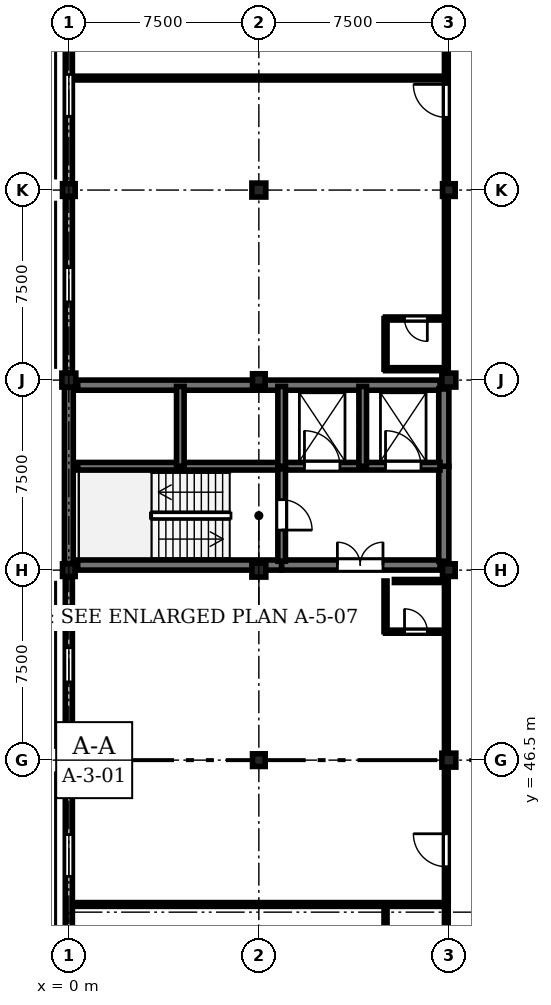
"""IFC4 building model, lengths in metres.
Left out: names, types, materials, properties, quantities, classifications, styles, units other than length and angle.
Written with IfcOpenShell. Run it as: python <this file> out.ifc"""

import sys

from ifc_helpers import new_model, si_unit, direction, frame, frame_2d, origin, origin_2d, place, context, subcontext, project, spatial, rectangle, extrude, element, fill, save


model = new_model("IFC4")
c1 = context("Model", 3, precision=1e-05, world=origin(), true_north=direction((0.0, 1.0)))
c2 = subcontext(c1, "Body", "Model", "MODEL_VIEW")
j1 = project(units=[si_unit("LENGTHUNIT", "METRE"), si_unit("PLANEANGLEUNIT", "RADIAN")], contexts=[c1])
p1 = place(None, origin())
s1 = spatial("IfcSite", under=j1, at=p1, CompositionType="ELEMENT")
p2 = place(p1, origin())
s2 = spatial("IfcBuilding", under=s1, at=p2, CompositionType="ELEMENT")
p3 = place(p2, frame((0.0, 0.0, 25.95)))
s3 = spatial("IfcBuildingStorey", under=s2, at=p3, CompositionType="ELEMENT", Elevation=25.95)
p4 = place(p3, frame((0.0, 46.5, 0.0), z_axis=(0.0, 0.0, 1.0), x_axis=(1.0, 0.0, 0.0)))
e1 = element("IfcColumn", 1, at=p4, inside=s3, PredefinedType="COLUMN", context=c2, shape_type="SweptSolid", body=[
    extrude(rectangle(XDim=0.55, YDim=0.55, at=origin_2d()), origin(), (0.0, 0.0, 1.0), 4.05),
])
p5 = place(p3, frame((0.0, 54.0, 0.0), z_axis=(0.0, 0.0, 1.0), x_axis=(1.0, 0.0, 0.0)))
e2 = element("IfcColumn", 2, at=p5, inside=s3, PredefinedType="COLUMN", context=c2, shape_type="SweptSolid", body=[
    extrude(rectangle(XDim=0.5, YDim=0.5, at=origin_2d()), origin(), (0.0, 0.0, 1.0), 4.05),
])
p6 = place(p3, frame((0.0, 61.5, 0.0), z_axis=(0.0, 0.0, 1.0), x_axis=(1.0, 0.0, 0.0)))
e3 = element("IfcColumn", 3, at=p6, inside=s3, PredefinedType="COLUMN", context=c2, shape_type="SweptSolid", body=[
    extrude(rectangle(XDim=0.55, YDim=0.55, at=origin_2d()), origin(), (0.0, 0.0, 1.0), 4.05),
])
for number, where, z_axis, x_axis in (
    (4, (0.0, 69.0, 0.0), (0.0, 0.0, 1.0), (1.0, 0.0, 0.0)),
    (5, (7.5, 46.5, 0.0), (0.0, 0.0, 1.0), (1.0, 0.0, 0.0)),
):
    element("IfcColumn", number, at=place(p3, frame(where, z_axis=z_axis, x_axis=x_axis)), inside=s3, PredefinedType="COLUMN", context=c2, shape_type="SweptSolid", body=[
        extrude(rectangle(XDim=0.5, YDim=0.5, at=origin_2d()), origin(), (0.0, 0.0, 1.0), 4.05),
    ])
p7 = place(p3, frame((7.5, 54.0, 0.0), z_axis=(0.0, 0.0, 1.0), x_axis=(1.0, 0.0, 0.0)))
e6 = element("IfcColumn", 6, at=p7, inside=s3, PredefinedType="COLUMN", context=c2, shape_type="SweptSolid", body=[
    extrude(rectangle(XDim=0.55, YDim=0.55, at=origin_2d()), origin(), (0.0, 0.0, 1.0), 4.05),
])
p8 = place(p3, frame((7.5, 61.5, 0.0), z_axis=(0.0, 0.0, 1.0), x_axis=(1.0, 0.0, 0.0)))
e7 = element("IfcColumn", 7, at=p8, inside=s3, PredefinedType="COLUMN", context=c2, shape_type="SweptSolid", body=[
    extrude(rectangle(XDim=0.5, YDim=0.5, at=origin_2d()), origin(), (0.0, 0.0, 1.0), 4.05),
])
for number, where, z_axis, x_axis in (
    (8, (7.5, 69.0, 0.0), (0.0, 0.0, 1.0), (1.0, 0.0, 0.0)),
    (9, (15.0, 46.5, 0.0), (0.0, 0.0, 1.0), (1.0, 0.0, 0.0)),
):
    element("IfcColumn", number, at=place(p3, frame(where, z_axis=z_axis, x_axis=x_axis)), inside=s3, PredefinedType="COLUMN", context=c2, shape_type="SweptSolid", body=[
        extrude(rectangle(XDim=0.55, YDim=0.55, at=origin_2d()), origin(), (0.0, 0.0, 1.0), 4.05),
    ])
p9 = place(p3, frame((15.0, 54.0, 0.0), z_axis=(0.0, 0.0, 1.0), x_axis=(1.0, 0.0, 0.0)))
e10 = element("IfcColumn", 10, at=p9, inside=s3, PredefinedType="COLUMN", context=c2, shape_type="SweptSolid", body=[
    extrude(rectangle(XDim=0.5, YDim=0.5, at=origin_2d()), origin(), (0.0, 0.0, 1.0), 4.05),
])
p10 = place(p3, frame((15.0, 61.5, 0.0), z_axis=(0.0, 0.0, 1.0), x_axis=(1.0, 0.0, 0.0)))
e11 = element("IfcColumn", 11, at=p10, inside=s3, PredefinedType="COLUMN", context=c2, shape_type="SweptSolid", body=[
    extrude(rectangle(XDim=0.55, YDim=0.55, at=origin_2d()), origin(), (0.0, 0.0, 1.0), 4.05),
])
p11 = place(p3, frame((15.0, 69.0, 0.0), z_axis=(0.0, 0.0, 1.0), x_axis=(1.0, 0.0, 0.0)))
e12 = element("IfcColumn", 12, at=p11, inside=s3, PredefinedType="COLUMN", context=c2, shape_type="SweptSolid", body=[
    extrude(rectangle(XDim=0.5, YDim=0.5, at=origin_2d()), origin(), (0.0, 0.0, 1.0), 4.05),
])
p12 = place(p3, frame((0.0, 39.26, 0.0), z_axis=(0.0, 0.0, 1.0), x_axis=(0.0, 1.0, 0.0)))
e13 = element("IfcWall", 13, at=p12, inside=s3, PredefinedType="STANDARD", context=c2, shape_type="SweptSolid", body=[
    extrude(rectangle(XDim=6.955, YDim=0.28, at=frame_2d((3.478, 0.0))), origin(), (0.0, 0.0, 1.0), 3.17),
])
p13 = place(p12, frame((2.653, 0.0, 0.85)))
e14 = element("IfcOpeningElement", 14, at=p13, cuts=e13, PredefinedType="OPENING", context=c2, shape_type="SweptSolid", body=[
    extrude(rectangle(XDim=1.65, YDim=2.04, at=frame_2d((0.825, 1.02))), frame((0.0, 0.15, 0.0), z_axis=(0.0, -1.0, 0.0), x_axis=(1.0, 0.0, 0.0)), (0.0, 0.0, 1.0), 0.3),
])
p14 = place(p3, frame((0.0, 46.785, 0.0), z_axis=(0.0, 0.0, 1.0), x_axis=(0.0, 1.0, 0.0)))
e15 = element("IfcWall", 15, at=p14, inside=s3, PredefinedType="STANDARD", context=c2, shape_type="SweptSolid", body=[
    extrude(rectangle(XDim=6.955, YDim=0.28, at=frame_2d((3.478, 0.0))), origin(), (0.0, 0.0, 1.0), 3.17),
])
p15 = place(p14, frame((2.802, 0.0, 0.85)))
e16 = element("IfcOpeningElement", 16, at=p15, cuts=e15, PredefinedType="OPENING", context=c2, shape_type="SweptSolid", body=[
    extrude(rectangle(XDim=1.35, YDim=2.04, at=frame_2d((0.675, 1.02))), frame((0.0, 0.15, 0.0), z_axis=(0.0, -1.0, 0.0), x_axis=(1.0, 0.0, 0.0)), (0.0, 0.0, 1.0), 0.3),
])
p16 = place(p3, frame((0.0, 54.26, 0.0), z_axis=(0.0, 0.0, 1.0), x_axis=(0.0, 1.0, 0.0)))
e17 = element("IfcWall", 17, at=p16, inside=s3, PredefinedType="SHEAR", context=c2, shape_type="SweptSolid", body=[
    extrude(rectangle(XDim=6.955, YDim=0.35, at=frame_2d((3.478, 0.0))), origin(), (0.0, 0.0, 1.0), 3.77),
])
p17 = place(p3, frame((0.0, 61.785, 0.0), z_axis=(0.0, 0.0, 1.0), x_axis=(0.0, 1.0, 0.0)))
e18 = element("IfcWall", 18, at=p17, inside=s3, PredefinedType="STANDARD", context=c2, shape_type="SweptSolid", body=[
    extrude(rectangle(XDim=6.955, YDim=0.28, at=frame_2d((3.478, 0.0))), origin(), (0.0, 0.0, 1.0), 3.17),
])
p18 = place(p17, frame((2.802, 0.0, 0.85)))
e19 = element("IfcOpeningElement", 19, at=p18, cuts=e18, PredefinedType="OPENING", context=c2, shape_type="SweptSolid", body=[
    extrude(rectangle(XDim=1.35, YDim=2.04, at=frame_2d((0.675, 1.02))), frame((0.0, 0.15, 0.0), z_axis=(0.0, -1.0, 0.0), x_axis=(1.0, 0.0, 0.0)), (0.0, 0.0, 1.0), 0.3),
])
p19 = place(p3, frame((0.0, 69.26, 0.0), z_axis=(0.0, 0.0, 1.0), x_axis=(0.0, 1.0, 0.0)))
e20 = element("IfcWall", 20, at=p19, inside=s3, PredefinedType="STANDARD", context=c2, shape_type="SweptSolid", body=[
    extrude(rectangle(XDim=6.955, YDim=0.28, at=frame_2d((3.478, 0.0))), origin(), (0.0, 0.0, 1.0), 3.17),
])
p20 = place(p19, frame((2.653, 0.0, 0.85)))
e21 = element("IfcOpeningElement", 21, at=p20, cuts=e20, PredefinedType="OPENING", context=c2, shape_type="SweptSolid", body=[
    extrude(rectangle(XDim=1.65, YDim=2.04, at=frame_2d((0.825, 1.02))), frame((0.0, 0.15, 0.0), z_axis=(0.0, -1.0, 0.0), x_axis=(1.0, 0.0, 0.0)), (0.0, 0.0, 1.0), 0.3),
])
p21 = place(p3, frame((0.35, 54.2, 0.0), z_axis=(0.0, 0.0, 1.0), x_axis=(1.0, 0.0, 0.0)))
e22 = element("IfcWall", 22, at=p21, inside=s3, PredefinedType="SHEAR", context=c2, shape_type="SweptSolid", body=[
    extrude(rectangle(XDim=8.05, YDim=0.4, at=frame_2d((4.025, 0.0))), origin(), (0.0, 0.0, 1.0), 3.77),
])
p22 = place(p3, frame((8.4, 54.2, 0.0), z_axis=(0.0, 0.0, 1.0), x_axis=(1.0, 0.0, 0.0)))
e23 = element("IfcWall", 23, at=p22, inside=s3, PredefinedType="SHEAR", context=c2, shape_type="SweptSolid", body=[
    extrude(rectangle(XDim=6.25, YDim=0.4, at=frame_2d((3.125, 0.0))), origin(), (0.0, 0.0, 1.0), 3.77),
])
p23 = place(p22, frame((2.2, 0.0, 0.0)))
e24 = element("IfcOpeningElement", 24, at=p23, cuts=e23, PredefinedType="OPENING", context=c2, shape_type="SweptSolid", body=[
    extrude(rectangle(XDim=1.8, YDim=2.25, at=frame_2d((0.9, 1.125))), frame((0.0, 0.21, 0.0), z_axis=(0.0, -1.0, 0.0), x_axis=(1.0, 0.0, 0.0)), (0.0, 0.0, 1.0), 0.42),
])
p24 = place(p3, frame((0.35, 61.3, 0.0), z_axis=(0.0, 0.0, 1.0), x_axis=(1.0, 0.0, 0.0)))
e25 = element("IfcWall", 25, at=p24, inside=s3, PredefinedType="SHEAR", context=c2, shape_type="SweptSolid", body=[
    extrude(rectangle(XDim=14.3, YDim=0.4, at=frame_2d((7.15, 0.0))), origin(), (0.0, 0.0, 1.0), 3.77),
])
p25 = place(p3, frame((14.8, 54.35, 0.0), z_axis=(0.0, 0.0, 1.0), x_axis=(0.0, 1.0, 0.0)))
e26 = element("IfcWall", 26, at=p25, inside=s3, PredefinedType="SHEAR", context=c2, shape_type="SweptSolid", body=[
    extrude(rectangle(XDim=3.75, YDim=0.4, at=frame_2d((1.875, 0.0))), origin(), (0.0, 0.0, 1.0), 3.77),
])
p26 = place(p3, frame((14.8, 58.1, 0.0), z_axis=(0.0, 0.0, 1.0), x_axis=(0.0, 1.0, 0.0)))
e27 = element("IfcWall", 27, at=p26, inside=s3, PredefinedType="SHEAR", context=c2, shape_type="SweptSolid", body=[
    extrude(rectangle(XDim=3.05, YDim=0.4, at=frame_2d((1.525, 0.0))), origin(), (0.0, 0.0, 1.0), 3.77),
])
p27 = place(p3, frame((0.35, 58.1, 0.0), z_axis=(0.0, 0.0, 1.0), x_axis=(1.0, 0.0, 0.0)))
e28 = element("IfcWall", 28, at=p27, inside=s3, PredefinedType="SHEAR", context=c2, shape_type="SweptSolid", body=[
    extrude(rectangle(XDim=8.05, YDim=0.3, at=frame_2d((4.025, 0.0))), origin(), (0.0, 0.0, 1.0), 3.77),
])
p28 = place(p3, frame((8.4, 58.1, 0.0), z_axis=(0.0, 0.0, 1.0), x_axis=(1.0, 0.0, 0.0)))
e29 = element("IfcWall", 29, at=p28, inside=s3, PredefinedType="SHEAR", context=c2, shape_type="SweptSolid", body=[
    extrude(rectangle(XDim=6.25, YDim=0.3, at=frame_2d((3.125, 0.0))), origin(), (0.0, 0.0, 1.0), 3.77),
])
p29 = place(p28, frame((0.9, 0.0, 0.0)))
e30 = element("IfcOpeningElement", 30, at=p29, cuts=e29, PredefinedType="OPENING", context=c2, shape_type="SweptSolid", body=[
    extrude(rectangle(XDim=1.4, YDim=2.25, at=frame_2d((0.7, 1.125))), frame((0.0, 0.16, 0.0), z_axis=(0.0, -1.0, 0.0), x_axis=(1.0, 0.0, 0.0)), (0.0, 0.0, 1.0), 0.32),
])
p30 = place(p28, frame((4.1, 0.0, 0.0)))
e31 = element("IfcOpeningElement", 31, at=p30, cuts=e29, PredefinedType="OPENING", context=c2, shape_type="SweptSolid", body=[
    extrude(rectangle(XDim=1.4, YDim=2.25, at=frame_2d((0.7, 1.125))), frame((0.0, 0.16, 0.0), z_axis=(0.0, -1.0, 0.0), x_axis=(1.0, 0.0, 0.0)), (0.0, 0.0, 1.0), 0.32),
])
p31 = place(p3, frame((8.4, 58.0, 0.0), z_axis=(0.0, 0.0, 1.0), x_axis=(0.0, -1.0, 0.0)))
e32 = element("IfcWall", 32, at=p31, inside=s3, PredefinedType="SHEAR", context=c2, shape_type="SweptSolid", body=[
    extrude(rectangle(XDim=3.65, YDim=0.3, at=frame_2d((1.825, 0.0))), origin(), (0.0, 0.0, 1.0), 3.77),
])
p32 = place(p31, frame((1.22, 0.0, 0.0)))
e33 = element("IfcOpeningElement", 33, at=p32, cuts=e32, PredefinedType="OPENING", context=c2, shape_type="SweptSolid", body=[
    extrude(rectangle(XDim=1.2, YDim=2.25, at=frame_2d((0.6, 1.125))), frame((0.0, 0.16, 0.0), z_axis=(0.0, -1.0, 0.0), x_axis=(1.0, 0.0, 0.0)), (0.0, 0.0, 1.0), 0.32),
])
for number, where, z_axis, x_axis in (
    (34, (4.4, 58.1, 0.0), (0.0, 0.0, 1.0), (0.0, 1.0, 0.0)),
    (35, (8.4, 58.1, 0.0), (0.0, 0.0, 1.0), (0.0, 1.0, 0.0)),
    (36, (11.6, 58.1, 0.0), (0.0, 0.0, 1.0), (0.0, 1.0, 0.0)),
):
    element("IfcWall", number, at=place(p3, frame(where, z_axis=z_axis, x_axis=x_axis)), inside=s3, PredefinedType="SHEAR", context=c2, shape_type="SweptSolid", body=[
        extrude(rectangle(XDim=3.15, YDim=0.3, at=frame_2d((1.575, 0.0))), origin(), (0.0, 0.0, 1.0), 3.77),
    ])
p33 = place(p3, frame((14.9, 28.197, 0.0), z_axis=(0.0, 0.0, 1.0), x_axis=(0.0, 1.0, 0.0)))
e37 = element("IfcWall", 37, at=p33, inside=s3, PredefinedType="PARTITIONING", context=c2, shape_type="SweptSolid", body=[
    extrude(rectangle(XDim=12.606, YDim=0.15, at=frame_2d((6.303, 0.0))), origin(), (0.0, 0.0, 1.0), 3.055),
])
p34 = place(p33, frame((6.704, 0.0, 0.0)))
e38 = element("IfcOpeningElement", 38, at=p34, cuts=e37, PredefinedType="OPENING", context=c2, shape_type="SweptSolid", body=[
    extrude(rectangle(XDim=1.35, YDim=2.25, at=frame_2d((0.675, 1.125))), frame((0.0, 0.085, 0.0), z_axis=(0.0, -1.0, 0.0), x_axis=(1.0, 0.0, 0.0)), (0.0, 0.0, 1.0), 0.17),
])
p35 = place(p3, frame((12.5, 38.803, 0.0), z_axis=(0.0, 0.0, 1.0), x_axis=(0.0, 1.0, 0.0)))
e39 = element("IfcWall", 39, at=p35, inside=s3, PredefinedType="PARTITIONING", context=c2, shape_type="SweptSolid", body=[
    extrude(rectangle(XDim=2.0, YDim=0.12, at=frame_2d((1.0, 0.0))), origin(), (0.0, 0.0, 1.0), 3.755),
])
p36 = place(p3, frame((14.9, 40.963, 0.0), z_axis=(0.0, 0.0, 1.0), x_axis=(0.0, 1.0, 0.0)))
e40 = element("IfcWall", 40, at=p36, inside=s3, PredefinedType="PARTITIONING", context=c2, shape_type="SweptSolid", body=[
    extrude(rectangle(XDim=12.607, YDim=0.15, at=frame_2d((6.303, 0.0))), origin(), (0.0, 0.0, 1.0), 3.205),
])
p37 = place(p36, frame((1.331, 0.0, 0.0)))
e41 = element("IfcOpeningElement", 41, at=p37, cuts=e40, PredefinedType="OPENING", context=c2, shape_type="SweptSolid", body=[
    extrude(rectangle(XDim=1.3, YDim=2.2, at=frame_2d((0.65, 1.1))), frame((0.0, 0.085, 0.0), z_axis=(0.0, -1.0, 0.0), x_axis=(1.0, 0.0, 0.0)), (0.0, 0.0, 1.0), 0.17),
])
p38 = place(p3, frame((12.5, 51.57, 0.0), z_axis=(0.0, 0.0, 1.0), x_axis=(1.0, 0.0, 0.0)))
e42 = element("IfcWall", 42, at=p38, inside=s3, PredefinedType="PARTITIONING", context=c2, shape_type="SweptSolid", body=[
    extrude(rectangle(XDim=2.4, YDim=0.12, at=frame_2d((1.2, 0.0))), origin(), (0.0, 0.0, 1.0), 3.755),
])
p39 = place(p38, frame((0.75, 0.0, 0.0)))
e43 = element("IfcOpeningElement", 43, at=p39, cuts=e42, PredefinedType="OPENING", context=c2, shape_type="SweptSolid", body=[
    extrude(rectangle(XDim=0.9, YDim=2.1, at=frame_2d((0.45, 1.05))), frame((0.0, 0.07, 0.0), z_axis=(0.0, -1.0, 0.0), x_axis=(1.0, 0.0, 0.0)), (0.0, 0.0, 1.0), 0.14),
])
p40 = place(p3, frame((12.5, 51.57, 0.0), z_axis=(0.0, 0.0, 1.0), x_axis=(0.0, 1.0, 0.0)))
e44 = element("IfcWall", 44, at=p40, inside=s3, PredefinedType="PARTITIONING", context=c2, shape_type="SweptSolid", body=[
    extrude(rectangle(XDim=2.0, YDim=0.12, at=frame_2d((1.0, 0.0))), origin(), (0.0, 0.0, 1.0), 3.755),
])
p41 = place(p3, frame((14.9, 61.93, 0.0), z_axis=(0.0, 0.0, 1.0), x_axis=(0.0, 1.0, 0.0)))
e45 = element("IfcWall", 45, at=p41, inside=s3, PredefinedType="PARTITIONING", context=c2, shape_type="SweptSolid", body=[
    extrude(rectangle(XDim=11.49, YDim=0.15, at=frame_2d((5.745, 0.0))), origin(), (0.0, 0.0, 1.0), 3.205),
])
p42 = place(p41, frame((9.94, 0.0, 0.0)))
e46 = element("IfcOpeningElement", 46, at=p42, cuts=e45, PredefinedType="OPENING", context=c2, shape_type="SweptSolid", body=[
    extrude(rectangle(XDim=1.3, YDim=2.2, at=frame_2d((0.65, 1.1))), frame((0.0, 0.085, 0.0), z_axis=(0.0, -1.0, 0.0), x_axis=(1.0, 0.0, 0.0)), (0.0, 0.0, 1.0), 0.17),
])
p43 = place(p3, frame((14.9, 63.93, 0.0), z_axis=(0.0, 0.0, 1.0), x_axis=(-1.0, 0.0, 0.0)))
e47 = element("IfcWall", 47, at=p43, inside=s3, PredefinedType="PARTITIONING", context=c2, shape_type="SweptSolid", body=[
    extrude(rectangle(XDim=2.4, YDim=0.12, at=frame_2d((1.2, 0.0))), origin(), (0.0, 0.0, 1.0), 3.755),
])
p44 = place(p43, frame((0.75, 0.0, 0.0)))
e48 = element("IfcOpeningElement", 48, at=p44, cuts=e47, PredefinedType="OPENING", context=c2, shape_type="SweptSolid", body=[
    extrude(rectangle(XDim=0.9, YDim=2.1, at=frame_2d((0.45, 1.05))), frame((0.0, 0.07, 0.0), z_axis=(0.0, -1.0, 0.0), x_axis=(1.0, 0.0, 0.0)), (0.0, 0.0, 1.0), 0.14),
])
p45 = place(p3, frame((12.5, 61.93, 0.0), z_axis=(0.0, 0.0, 1.0), x_axis=(0.0, 1.0, 0.0)))
e49 = element("IfcWall", 49, at=p45, inside=s3, PredefinedType="PARTITIONING", context=c2, shape_type="SweptSolid", body=[
    extrude(rectangle(XDim=2.0, YDim=0.12, at=frame_2d((1.0, 0.0))), origin(), (0.0, 0.0, 1.0), 3.755),
])
p46 = place(p3, frame((14.9, 73.58, 0.0), z_axis=(0.0, 0.0, 1.0), x_axis=(0.0, 1.0, 0.0)))
e50 = element("IfcWall", 50, at=p46, inside=s3, PredefinedType="PARTITIONING", context=c2, shape_type="SweptSolid", body=[
    extrude(rectangle(XDim=11.49, YDim=0.15, at=frame_2d((5.745, 0.0))), origin(), (0.0, 0.0, 1.0), 3.055),
])
p47 = place(p46, frame((6.998, 0.0, 0.0)))
e51 = element("IfcOpeningElement", 51, at=p47, cuts=e50, PredefinedType="OPENING", context=c2, shape_type="SweptSolid", body=[
    extrude(rectangle(XDim=1.35, YDim=2.25, at=frame_2d((0.675, 1.125))), frame((0.0, 0.085, 0.0), z_axis=(0.0, -1.0, 0.0), x_axis=(1.0, 0.0, 0.0)), (0.0, 0.0, 1.0), 0.17),
])
for number, where, z_axis, x_axis in (
    (52, (0.35, 40.803, 0.0), (0.0, 0.0, 1.0), (1.0, 0.0, 0.0)),
    (53, (0.35, 73.42, 0.0), (0.0, 0.0, 1.0), (1.0, 0.0, 0.0)),
):
    element("IfcWall", number, at=place(p3, frame(where, z_axis=z_axis, x_axis=x_axis)), inside=s3, PredefinedType="PARTITIONING", context=c2, shape_type="SweptSolid", body=[
        extrude(rectangle(XDim=14.55, YDim=0.15, at=frame_2d((7.275, 0.0))), origin(), (0.0, 0.0, 1.0), 3.755),
    ])
p48 = place(p3, frame((12.85, 53.57, 0.0), z_axis=(0.0, 0.0, 1.0), x_axis=(1.0, 0.0, 0.0)))
e54 = element("IfcWall", 54, at=p48, inside=s3, PredefinedType="PARTITIONING", context=c2, shape_type="SweptSolid", body=[
    extrude(rectangle(XDim=2.05, YDim=0.12, at=frame_2d((1.025, 0.0))), origin(), (0.0, 0.0, 1.0), 3.755),
])
p49 = place(p3, frame((12.5, 61.93, 0.0), z_axis=(0.0, 0.0, 1.0), x_axis=(1.0, 0.0, 0.0)))
e55 = element("IfcWall", 55, at=p49, inside=s3, PredefinedType="PARTITIONING", context=c2, shape_type="SweptSolid", body=[
    extrude(rectangle(XDim=2.4, YDim=0.12, at=frame_2d((1.2, 0.0))), origin(), (0.0, 0.0, 1.0), 3.755),
])
p50 = place(p13, origin())
e56 = element("IfcWindow", 56, at=p50, inside=s3, PartitioningType="SINGLE_PANEL", PredefinedType="WINDOW", context=c2, shape_type="SweptSolid", body=[
    extrude(rectangle(XDim=1.65, YDim=2.04, at=frame_2d((0.825, 1.02))), frame((0.0, 0.03, 0.0), z_axis=(0.0, -1.0, 0.0), x_axis=(1.0, 0.0, 0.0)), (0.0, 0.0, 1.0), 0.06),
])
fill(e14, e56)
p51 = place(p15, origin())
e57 = element("IfcWindow", 57, at=p51, inside=s3, PartitioningType="SINGLE_PANEL", PredefinedType="WINDOW", context=c2, shape_type="SweptSolid", body=[
    extrude(rectangle(XDim=1.35, YDim=2.04, at=frame_2d((0.675, 1.02))), frame((0.0, 0.03, 0.0), z_axis=(0.0, -1.0, 0.0), x_axis=(1.0, 0.0, 0.0)), (0.0, 0.0, 1.0), 0.06),
])
fill(e16, e57)
p52 = place(p18, origin())
e58 = element("IfcWindow", 58, at=p52, inside=s3, PartitioningType="SINGLE_PANEL", PredefinedType="WINDOW", context=c2, shape_type="SweptSolid", body=[
    extrude(rectangle(XDim=1.35, YDim=2.04, at=frame_2d((0.675, 1.02))), frame((0.0, 0.03, 0.0), z_axis=(0.0, -1.0, 0.0), x_axis=(1.0, 0.0, 0.0)), (0.0, 0.0, 1.0), 0.06),
])
fill(e19, e58)
p53 = place(p20, origin())
e59 = element("IfcWindow", 59, at=p53, inside=s3, PartitioningType="SINGLE_PANEL", PredefinedType="WINDOW", context=c2, shape_type="SweptSolid", body=[
    extrude(rectangle(XDim=1.65, YDim=2.04, at=frame_2d((0.825, 1.02))), frame((0.0, 0.03, 0.0), z_axis=(0.0, -1.0, 0.0), x_axis=(1.0, 0.0, 0.0)), (0.0, 0.0, 1.0), 0.06),
])
fill(e21, e59)
p54 = place(p23, origin())
e60 = element("IfcDoor", 60, at=p54, inside=s3, OperationType="DOUBLE_DOOR_SINGLE_SWING", PredefinedType="DOOR", context=c2, shape_type="SweptSolid", body=[
    extrude(rectangle(XDim=1.8, YDim=2.25, at=frame_2d((0.9, 1.125))), frame((0.0, 0.025, 0.0), z_axis=(0.0, -1.0, 0.0), x_axis=(1.0, 0.0, 0.0)), (0.0, 0.0, 1.0), 0.05),
])
fill(e24, e60)
p55 = place(p29, origin())
e61 = element("IfcDoor", 61, at=p55, inside=s3, OperationType="DOUBLE_DOOR_SLIDING", PredefinedType="DOOR", context=c2, shape_type="SweptSolid", body=[
    extrude(rectangle(XDim=1.4, YDim=2.25, at=frame_2d((0.7, 1.125))), frame((0.0, 0.025, 0.0), z_axis=(0.0, -1.0, 0.0), x_axis=(1.0, 0.0, 0.0)), (0.0, 0.0, 1.0), 0.05),
])
fill(e30, e61)
p56 = place(p30, origin())
e62 = element("IfcDoor", 62, at=p56, inside=s3, OperationType="DOUBLE_DOOR_SLIDING", PredefinedType="DOOR", context=c2, shape_type="SweptSolid", body=[
    extrude(rectangle(XDim=1.4, YDim=2.25, at=frame_2d((0.7, 1.125))), frame((0.0, 0.025, 0.0), z_axis=(0.0, -1.0, 0.0), x_axis=(1.0, 0.0, 0.0)), (0.0, 0.0, 1.0), 0.05),
])
fill(e31, e62)
p57 = place(p32, origin())
e63 = element("IfcDoor", 63, at=p57, inside=s3, OperationType="SINGLE_SWING_RIGHT", PredefinedType="DOOR", context=c2, shape_type="SweptSolid", body=[
    extrude(rectangle(XDim=1.2, YDim=2.25, at=frame_2d((0.6, 1.125))), frame((0.0, 0.025, 0.0), z_axis=(0.0, -1.0, 0.0), x_axis=(1.0, 0.0, 0.0)), (0.0, 0.0, 1.0), 0.05),
])
fill(e33, e63)
p58 = place(p37, origin())
e64 = element("IfcDoor", 64, at=p58, inside=s3, OperationType="SINGLE_SWING_RIGHT", PredefinedType="DOOR", context=c2, shape_type="SweptSolid", body=[
    extrude(rectangle(XDim=1.3, YDim=2.2, at=frame_2d((0.65, 1.1))), frame((0.0, 0.025, 0.0), z_axis=(0.0, -1.0, 0.0), x_axis=(1.0, 0.0, 0.0)), (0.0, 0.0, 1.0), 0.05),
])
fill(e41, e64)
p59 = place(p39, origin())
e65 = element("IfcDoor", 65, at=p59, inside=s3, OperationType="SINGLE_SWING_LEFT", PredefinedType="DOOR", context=c2, shape_type="SweptSolid", body=[
    extrude(rectangle(XDim=0.9, YDim=2.1, at=frame_2d((0.45, 1.05))), frame((0.0, 0.025, 0.0), z_axis=(0.0, -1.0, 0.0), x_axis=(1.0, 0.0, 0.0)), (0.0, 0.0, 1.0), 0.05),
])
fill(e43, e65)
p60 = place(p42, origin())
e66 = element("IfcDoor", 66, at=p60, inside=s3, OperationType="SINGLE_SWING_RIGHT", PredefinedType="DOOR", context=c2, shape_type="SweptSolid", body=[
    extrude(rectangle(XDim=1.3, YDim=2.2, at=frame_2d((0.65, 1.1))), frame((0.0, 0.025, 0.0), z_axis=(0.0, -1.0, 0.0), x_axis=(1.0, 0.0, 0.0)), (0.0, 0.0, 1.0), 0.05),
])
fill(e46, e66)
p61 = place(p44, origin())
e67 = element("IfcDoor", 67, at=p61, inside=s3, OperationType="SINGLE_SWING_LEFT", PredefinedType="DOOR", context=c2, shape_type="SweptSolid", body=[
    extrude(rectangle(XDim=0.9, YDim=2.1, at=frame_2d((0.45, 1.05))), frame((0.0, 0.025, 0.0), z_axis=(0.0, -1.0, 0.0), x_axis=(1.0, 0.0, 0.0)), (0.0, 0.0, 1.0), 0.05),
])
fill(e48, e67)
save(model, sys.argv[1])
